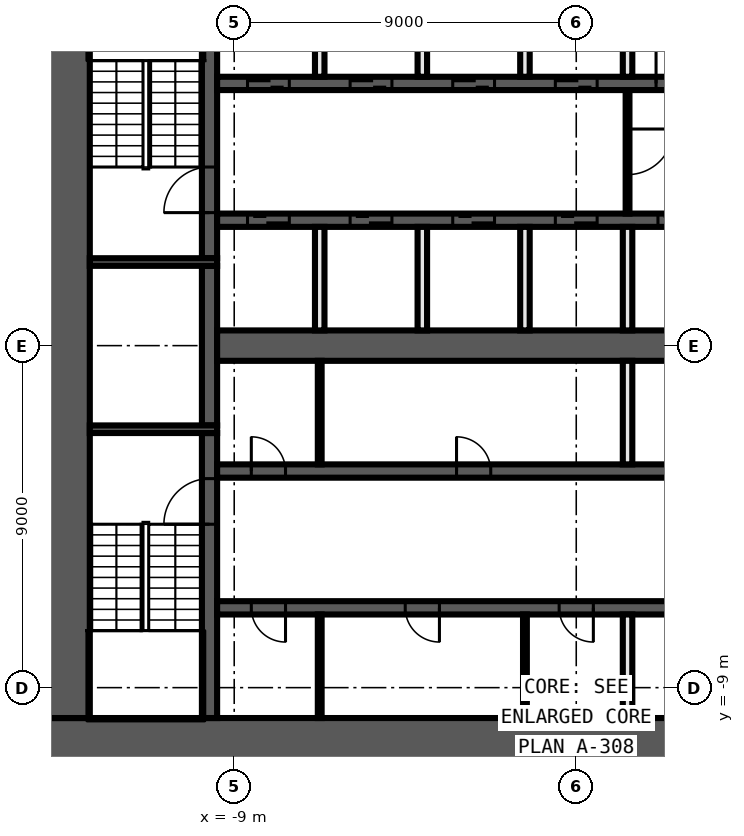
"""IFC4 building model, lengths in metres.
Left out: names, types, materials, properties, quantities, classifications, styles, units other than length and angle.
Written with IfcOpenShell. Run it as: python <this file> out.ifc"""

import sys

from ifc_helpers import new_model, si_unit, direction, frame, frame_2d, origin, place, context, subcontext, project, spatial, rectangle, extrude, element, fill, save


model = new_model("IFC4")
c1 = context("Model", 3, precision=1e-05, world=origin(), true_north=direction((0.0, 1.0)))
c2 = subcontext(c1, "Body", "Model", "MODEL_VIEW")
j1 = project(units=[si_unit("LENGTHUNIT", "METRE"), si_unit("PLANEANGLEUNIT", "RADIAN")], contexts=[c1])
p1 = place(None, origin())
s1 = spatial("IfcSite", under=j1, at=p1, CompositionType="ELEMENT")
p2 = place(p1, origin())
s2 = spatial("IfcBuilding", under=s1, at=p2, CompositionType="ELEMENT")
p3 = place(p2, frame((0.0, 0.0, 55.1)))
s3 = spatial("IfcBuildingStorey", under=s2, at=p3, CompositionType="ELEMENT", Elevation=55.1)
p4 = place(p3, frame((14.0, -10.4, 0.0), z_axis=(0.0, 0.0, 1.0), x_axis=(-1.0, 0.0, 0.0)))
e1 = element("IfcWall", 1, at=p4, inside=s3, PredefinedType="SHEAR", context=c2, shape_type="SweptSolid", body=[
    extrude(rectangle(XDim=28.0, YDim=1.2, at=frame_2d((14.0, 0.0))), origin(), (0.0, 0.0, 1.0), 3.3),
])
p5 = place(p4, frame((5.1, 0.0, 0.0)))
e2 = element("IfcOpeningElement", 2, at=p5, cuts=e1, PredefinedType="OPENING", context=c2, shape_type="SweptSolid", body=[
    extrude(rectangle(XDim=1.6, YDim=2.1, at=frame_2d((0.8, 1.05))), frame((0.0, 0.61, 0.0), z_axis=(0.0, -1.0, 0.0), x_axis=(1.0, 0.0, 0.0)), (0.0, 0.0, 1.0), 1.22),
])
p6 = place(p3, frame((-13.4, -9.8, 0.0), z_axis=(0.0, 0.0, 1.0), x_axis=(0.0, 1.0, 0.0)))
e3 = element("IfcWall", 3, at=p6, inside=s3, PredefinedType="SHEAR", context=c2, shape_type="SweptSolid", body=[
    extrude(rectangle(XDim=19.6, YDim=1.2, at=frame_2d((9.8, 0.0))), origin(), (0.0, 0.0, 1.0), 3.3),
])
p7 = place(p3, frame((-9.65, -9.8, 0.0), z_axis=(0.0, 0.0, 1.0), x_axis=(0.0, 1.0, 0.0)))
e4 = element("IfcWall", 4, at=p7, inside=s3, PredefinedType="SHEAR", context=c2, shape_type="SweptSolid", body=[
    extrude(rectangle(XDim=7.5, YDim=0.4, at=frame_2d((3.75, 0.0))), origin(), (0.0, 0.0, 1.0), 3.3),
])
p8 = place(p7, frame((5.1, 0.0, 0.0)))
e5 = element("IfcOpeningElement", 5, at=p8, cuts=e4, PredefinedType="OPENING", context=c2, shape_type="SweptSolid", body=[
    extrude(rectangle(XDim=1.2, YDim=2.1, at=frame_2d((0.6, 1.05))), frame((0.0, 0.21, 0.0), z_axis=(0.0, -1.0, 0.0), x_axis=(1.0, 0.0, 0.0)), (0.0, 0.0, 1.0), 0.42),
])
p9 = place(p3, frame((-9.65, -2.1, 0.0), z_axis=(0.0, 0.0, 1.0), x_axis=(0.0, 1.0, 0.0)))
e6 = element("IfcWall", 6, at=p9, inside=s3, PredefinedType="SHEAR", context=c2, shape_type="SweptSolid", body=[
    extrude(rectangle(XDim=4.2, YDim=0.4, at=frame_2d((2.1, 0.0))), origin(), (0.0, 0.0, 1.0), 3.3),
])
p10 = place(p3, frame((-9.65, 2.3, 0.0), z_axis=(0.0, 0.0, 1.0), x_axis=(0.0, 1.0, 0.0)))
e7 = element("IfcWall", 7, at=p10, inside=s3, PredefinedType="SHEAR", context=c2, shape_type="SweptSolid", body=[
    extrude(rectangle(XDim=7.5, YDim=0.4, at=frame_2d((3.75, 0.0))), origin(), (0.0, 0.0, 1.0), 3.3),
])
p11 = place(p10, frame((1.2, 0.0, 0.0)))
e8 = element("IfcOpeningElement", 8, at=p11, cuts=e7, PredefinedType="OPENING", context=c2, shape_type="SweptSolid", body=[
    extrude(rectangle(XDim=1.2, YDim=2.1, at=frame_2d((0.6, 1.05))), frame((0.0, 0.21, 0.0), z_axis=(0.0, -1.0, 0.0), x_axis=(1.0, 0.0, 0.0)), (0.0, 0.0, 1.0), 0.42),
])
for number, where, z_axis, x_axis in (
    (9, (-9.45, 2.2, 0.0), (0.0, 0.0, 1.0), (-1.0, 0.0, 0.0)),
    (10, (-9.45, -2.2, 0.0), (0.0, 0.0, 1.0), (-1.0, 0.0, 0.0)),
):
    element("IfcWall", number, at=place(p3, frame(where, z_axis=z_axis, x_axis=x_axis)), inside=s3, PredefinedType="SHEAR", context=c2, shape_type="SweptSolid", body=[
        extrude(rectangle(XDim=3.35, YDim=0.2, at=frame_2d((1.675, 0.0))), origin(), (0.0, 0.0, 1.0), 3.3),
    ])
p12 = place(p3, frame((-9.45, 6.9, 0.0), z_axis=(0.0, 0.0, 1.0), x_axis=(1.0, 0.0, 0.0)))
e11 = element("IfcWall", 11, at=p12, inside=s3, PredefinedType="SHEAR", context=c2, shape_type="SweptSolid", body=[
    extrude(rectangle(XDim=18.9, YDim=0.35, at=frame_2d((9.45, 0.0))), origin(), (0.0, 0.0, 1.0), 3.3),
])
p13 = place(p12, frame((0.8, 0.0, 0.0)))
e12 = element("IfcOpeningElement", 12, at=p13, cuts=e11, PredefinedType="OPENING", context=c2, shape_type="SweptSolid", body=[
    extrude(rectangle(XDim=1.1, YDim=2.1, at=frame_2d((0.55, 1.05))), frame((0.0, 0.185, 0.0), z_axis=(0.0, -1.0, 0.0), x_axis=(1.0, 0.0, 0.0)), (0.0, 0.0, 1.0), 0.37),
])
p14 = place(p12, frame((3.5, 0.0, 0.0)))
e13 = element("IfcOpeningElement", 13, at=p14, cuts=e11, PredefinedType="OPENING", context=c2, shape_type="SweptSolid", body=[
    extrude(rectangle(XDim=1.1, YDim=2.1, at=frame_2d((0.55, 1.05))), frame((0.0, 0.185, 0.0), z_axis=(0.0, -1.0, 0.0), x_axis=(1.0, 0.0, 0.0)), (0.0, 0.0, 1.0), 0.37),
])
p15 = place(p12, frame((6.2, 0.0, 0.0)))
e14 = element("IfcOpeningElement", 14, at=p15, cuts=e11, PredefinedType="OPENING", context=c2, shape_type="SweptSolid", body=[
    extrude(rectangle(XDim=1.1, YDim=2.1, at=frame_2d((0.55, 1.05))), frame((0.0, 0.185, 0.0), z_axis=(0.0, -1.0, 0.0), x_axis=(1.0, 0.0, 0.0)), (0.0, 0.0, 1.0), 0.37),
])
p16 = place(p12, frame((8.9, 0.0, 0.0)))
e15 = element("IfcOpeningElement", 15, at=p16, cuts=e11, PredefinedType="OPENING", context=c2, shape_type="SweptSolid", body=[
    extrude(rectangle(XDim=1.1, YDim=2.1, at=frame_2d((0.55, 1.05))), frame((0.0, 0.185, 0.0), z_axis=(0.0, -1.0, 0.0), x_axis=(1.0, 0.0, 0.0)), (0.0, 0.0, 1.0), 0.37),
])
p17 = place(p12, frame((11.55, 0.0, 0.0)))
e16 = element("IfcOpeningElement", 16, at=p17, cuts=e11, PredefinedType="OPENING", context=c2, shape_type="SweptSolid", body=[
    extrude(rectangle(XDim=1.2, YDim=2.1, at=frame_2d((0.6, 1.05))), frame((0.0, 0.185, 0.0), z_axis=(0.0, -1.0, 0.0), x_axis=(1.0, 0.0, 0.0)), (0.0, 0.0, 1.0), 0.37),
])
p18 = place(p12, frame((14.3, 0.0, 0.0)))
e17 = element("IfcOpeningElement", 17, at=p18, cuts=e11, PredefinedType="OPENING", context=c2, shape_type="SweptSolid", body=[
    extrude(rectangle(XDim=1.1, YDim=2.1, at=frame_2d((0.55, 1.05))), frame((0.0, 0.185, 0.0), z_axis=(0.0, -1.0, 0.0), x_axis=(1.0, 0.0, 0.0)), (0.0, 0.0, 1.0), 0.37),
])
p19 = place(p12, frame((17.0, 0.0, 0.0)))
e18 = element("IfcOpeningElement", 18, at=p19, cuts=e11, PredefinedType="OPENING", context=c2, shape_type="SweptSolid", body=[
    extrude(rectangle(XDim=1.1, YDim=2.1, at=frame_2d((0.55, 1.05))), frame((0.0, 0.185, 0.0), z_axis=(0.0, -1.0, 0.0), x_axis=(1.0, 0.0, 0.0)), (0.0, 0.0, 1.0), 0.37),
])
p20 = place(p3, frame((9.45, 3.3, 0.0), z_axis=(0.0, 0.0, 1.0), x_axis=(-1.0, 0.0, 0.0)))
e19 = element("IfcWall", 19, at=p20, inside=s3, PredefinedType="SHEAR", context=c2, shape_type="SweptSolid", body=[
    extrude(rectangle(XDim=18.9, YDim=0.35, at=frame_2d((9.45, 0.0))), origin(), (0.0, 0.0, 1.0), 3.3),
])
p21 = place(p20, frame((17.0, 0.0, 0.0)))
e20 = element("IfcOpeningElement", 20, at=p21, cuts=e19, PredefinedType="OPENING", context=c2, shape_type="SweptSolid", body=[
    extrude(rectangle(XDim=1.1, YDim=2.1, at=frame_2d((0.55, 1.05))), frame((0.0, 0.185, 0.0), z_axis=(0.0, -1.0, 0.0), x_axis=(1.0, 0.0, 0.0)), (0.0, 0.0, 1.0), 0.37),
])
p22 = place(p20, frame((14.3, 0.0, 0.0)))
e21 = element("IfcOpeningElement", 21, at=p22, cuts=e19, PredefinedType="OPENING", context=c2, shape_type="SweptSolid", body=[
    extrude(rectangle(XDim=1.1, YDim=2.1, at=frame_2d((0.55, 1.05))), frame((0.0, 0.185, 0.0), z_axis=(0.0, -1.0, 0.0), x_axis=(1.0, 0.0, 0.0)), (0.0, 0.0, 1.0), 0.37),
])
p23 = place(p20, frame((11.6, 0.0, 0.0)))
e22 = element("IfcOpeningElement", 22, at=p23, cuts=e19, PredefinedType="OPENING", context=c2, shape_type="SweptSolid", body=[
    extrude(rectangle(XDim=1.1, YDim=2.1, at=frame_2d((0.55, 1.05))), frame((0.0, 0.185, 0.0), z_axis=(0.0, -1.0, 0.0), x_axis=(1.0, 0.0, 0.0)), (0.0, 0.0, 1.0), 0.37),
])
p24 = place(p20, frame((8.9, 0.0, 0.0)))
e23 = element("IfcOpeningElement", 23, at=p24, cuts=e19, PredefinedType="OPENING", context=c2, shape_type="SweptSolid", body=[
    extrude(rectangle(XDim=1.1, YDim=2.1, at=frame_2d((0.55, 1.05))), frame((0.0, 0.185, 0.0), z_axis=(0.0, -1.0, 0.0), x_axis=(1.0, 0.0, 0.0)), (0.0, 0.0, 1.0), 0.37),
])
p25 = place(p20, frame((6.2, 0.0, 0.0)))
e24 = element("IfcOpeningElement", 24, at=p25, cuts=e19, PredefinedType="OPENING", context=c2, shape_type="SweptSolid", body=[
    extrude(rectangle(XDim=1.1, YDim=2.1, at=frame_2d((0.55, 1.05))), frame((0.0, 0.185, 0.0), z_axis=(0.0, -1.0, 0.0), x_axis=(1.0, 0.0, 0.0)), (0.0, 0.0, 1.0), 0.37),
])
p26 = place(p20, frame((3.5, 0.0, 0.0)))
e25 = element("IfcOpeningElement", 25, at=p26, cuts=e19, PredefinedType="OPENING", context=c2, shape_type="SweptSolid", body=[
    extrude(rectangle(XDim=1.1, YDim=2.1, at=frame_2d((0.55, 1.05))), frame((0.0, 0.185, 0.0), z_axis=(0.0, -1.0, 0.0), x_axis=(1.0, 0.0, 0.0)), (0.0, 0.0, 1.0), 0.37),
])
p27 = place(p20, frame((0.9, 0.0, 0.0)))
e26 = element("IfcOpeningElement", 26, at=p27, cuts=e19, PredefinedType="OPENING", context=c2, shape_type="SweptSolid", body=[
    extrude(rectangle(XDim=0.9, YDim=2.1, at=frame_2d((0.45, 1.05))), frame((0.0, 0.185, 0.0), z_axis=(0.0, -1.0, 0.0), x_axis=(1.0, 0.0, 0.0)), (0.0, 0.0, 1.0), 0.37),
])
p28 = place(p3, frame((-9.45, -3.3, 0.0), z_axis=(0.0, 0.0, 1.0), x_axis=(1.0, 0.0, 0.0)))
e27 = element("IfcWall", 27, at=p28, inside=s3, PredefinedType="SHEAR", context=c2, shape_type="SweptSolid", body=[
    extrude(rectangle(XDim=18.9, YDim=0.35, at=frame_2d((9.45, 0.0))), origin(), (0.0, 0.0, 1.0), 3.3),
])
p29 = place(p28, frame((17.0, 0.0, 0.0)))
e28 = element("IfcOpeningElement", 28, at=p29, cuts=e27, PredefinedType="OPENING", context=c2, shape_type="SweptSolid", body=[
    extrude(rectangle(XDim=1.1, YDim=2.1, at=frame_2d((0.55, 1.05))), frame((0.0, 0.185, 0.0), z_axis=(0.0, -1.0, 0.0), x_axis=(1.0, 0.0, 0.0)), (0.0, 0.0, 1.0), 0.37),
])
p30 = place(p28, frame((0.9, 0.0, 0.0)))
e29 = element("IfcOpeningElement", 29, at=p30, cuts=e27, PredefinedType="OPENING", context=c2, shape_type="SweptSolid", body=[
    extrude(rectangle(XDim=0.9, YDim=2.1, at=frame_2d((0.45, 1.05))), frame((0.0, 0.185, 0.0), z_axis=(0.0, -1.0, 0.0), x_axis=(1.0, 0.0, 0.0)), (0.0, 0.0, 1.0), 0.37),
])
p31 = place(p28, frame((6.3, 0.0, 0.0)))
e30 = element("IfcOpeningElement", 30, at=p31, cuts=e27, PredefinedType="OPENING", context=c2, shape_type="SweptSolid", body=[
    extrude(rectangle(XDim=0.9, YDim=2.1, at=frame_2d((0.45, 1.05))), frame((0.0, 0.185, 0.0), z_axis=(0.0, -1.0, 0.0), x_axis=(1.0, 0.0, 0.0)), (0.0, 0.0, 1.0), 0.37),
])
p32 = place(p3, frame((9.45, -6.9, 0.0), z_axis=(0.0, 0.0, 1.0), x_axis=(-1.0, 0.0, 0.0)))
e31 = element("IfcWall", 31, at=p32, inside=s3, PredefinedType="SHEAR", context=c2, shape_type="SweptSolid", body=[
    extrude(rectangle(XDim=18.9, YDim=0.35, at=frame_2d((9.45, 0.0))), origin(), (0.0, 0.0, 1.0), 3.3),
])
p33 = place(p32, frame((0.75, 0.0, 0.0)))
e32 = element("IfcOpeningElement", 32, at=p33, cuts=e31, PredefinedType="OPENING", context=c2, shape_type="SweptSolid", body=[
    extrude(rectangle(XDim=1.2, YDim=2.1, at=frame_2d((0.6, 1.05))), frame((0.0, 0.185, 0.0), z_axis=(0.0, -1.0, 0.0), x_axis=(1.0, 0.0, 0.0)), (0.0, 0.0, 1.0), 0.37),
])
p34 = place(p32, frame((17.1, 0.0, 0.0)))
e33 = element("IfcOpeningElement", 33, at=p34, cuts=e31, PredefinedType="OPENING", context=c2, shape_type="SweptSolid", body=[
    extrude(rectangle(XDim=0.9, YDim=2.1, at=frame_2d((0.45, 1.05))), frame((0.0, 0.185, 0.0), z_axis=(0.0, -1.0, 0.0), x_axis=(1.0, 0.0, 0.0)), (0.0, 0.0, 1.0), 0.37),
])
p35 = place(p32, frame((13.05, 0.0, 0.0)))
e34 = element("IfcOpeningElement", 34, at=p35, cuts=e31, PredefinedType="OPENING", context=c2, shape_type="SweptSolid", body=[
    extrude(rectangle(XDim=0.9, YDim=2.1, at=frame_2d((0.45, 1.05))), frame((0.0, 0.185, 0.0), z_axis=(0.0, -1.0, 0.0), x_axis=(1.0, 0.0, 0.0)), (0.0, 0.0, 1.0), 0.37),
])
p36 = place(p32, frame((9.0, 0.0, 0.0)))
e35 = element("IfcOpeningElement", 35, at=p36, cuts=e31, PredefinedType="OPENING", context=c2, shape_type="SweptSolid", body=[
    extrude(rectangle(XDim=0.9, YDim=2.1, at=frame_2d((0.45, 1.05))), frame((0.0, 0.185, 0.0), z_axis=(0.0, -1.0, 0.0), x_axis=(1.0, 0.0, 0.0)), (0.0, 0.0, 1.0), 0.37),
])
p37 = place(p3, frame((-9.45, 0.0, 0.0), z_axis=(0.0, 0.0, 1.0), x_axis=(1.0, 0.0, 0.0)))
e36 = element("IfcWall", 36, at=p37, inside=s3, PredefinedType="SHEAR", context=c2, shape_type="SweptSolid", body=[
    extrude(rectangle(XDim=18.9, YDim=0.8, at=frame_2d((9.45, 0.0))), origin(), (0.0, 0.0, 1.0), 3.3),
])
p38 = place(p3, frame((1.35, 6.725, 0.0), z_axis=(0.0, 0.0, 1.0), x_axis=(0.0, -1.0, 0.0)))
e37 = element("IfcWall", 37, at=p38, inside=s3, PredefinedType="PARTITIONING", context=c2, shape_type="SweptSolid", body=[
    extrude(rectangle(XDim=3.25, YDim=0.1, at=frame_2d((1.625, 0.0))), origin(), (0.0, 0.0, 1.0), 3.3),
])
p39 = place(p38, frame((1.025, 0.0, 0.0)))
e38 = element("IfcOpeningElement", 38, at=p39, cuts=e37, PredefinedType="OPENING", context=c2, shape_type="SweptSolid", body=[
    extrude(rectangle(XDim=1.2, YDim=2.1, at=frame_2d((0.6, 1.05))), frame((0.0, 0.06, 0.0), z_axis=(0.0, -1.0, 0.0), x_axis=(1.0, 0.0, 0.0)), (0.0, 0.0, 1.0), 0.12),
])
for number, where, z_axis, x_axis in (
    (39, (1.35, -9.8, 0.0), (0.0, 0.0, 1.0), (0.0, 1.0, 0.0)),
    (40, (1.35, -3.125, 0.0), (0.0, 0.0, 1.0), (0.0, 1.0, 0.0)),
    (41, (1.35, 0.4, 0.0), (0.0, 0.0, 1.0), (0.0, 1.0, 0.0)),
    (42, (1.35, 7.075, 0.0), (0.0, 0.0, 1.0), (0.0, 1.0, 0.0)),
):
    element("IfcWall", number, at=place(p3, frame(where, z_axis=z_axis, x_axis=x_axis)), inside=s3, PredefinedType="SOLIDWALL", context=c2, shape_type="SweptSolid", body=[
        extrude(rectangle(XDim=2.725, YDim=0.25, at=frame_2d((1.363, 0.0))), origin(), (0.0, 0.0, 1.0), 3.3),
    ])
p40 = place(p3, frame((-1.35, -9.8, 0.0), z_axis=(0.0, 0.0, 1.0), x_axis=(0.0, 1.0, 0.0)))
e43 = element("IfcWall", 43, at=p40, inside=s3, PredefinedType="PARTITIONING", context=c2, shape_type="SweptSolid", body=[
    extrude(rectangle(XDim=2.725, YDim=0.1, at=frame_2d((1.363, 0.0))), origin(), (0.0, 0.0, 1.0), 3.3),
])
for number, where, z_axis, x_axis in (
    (44, (-1.35, 0.4, 0.0), (0.0, 0.0, 1.0), (0.0, 1.0, 0.0)),
    (45, (-1.35, 7.075, 0.0), (0.0, 0.0, 1.0), (0.0, 1.0, 0.0)),
    (46, (-4.05, 0.4, 0.0), (0.0, 0.0, 1.0), (0.0, 1.0, 0.0)),
    (47, (-4.05, 7.075, 0.0), (0.0, 0.0, 1.0), (0.0, 1.0, 0.0)),
):
    element("IfcWall", number, at=place(p3, frame(where, z_axis=z_axis, x_axis=x_axis)), inside=s3, PredefinedType="SOLIDWALL", context=c2, shape_type="SweptSolid", body=[
        extrude(rectangle(XDim=2.725, YDim=0.25, at=frame_2d((1.363, 0.0))), origin(), (0.0, 0.0, 1.0), 3.3),
    ])
for number, where, z_axis, x_axis in (
    (48, (-6.75, -9.8, 0.0), (0.0, 0.0, 1.0), (0.0, 1.0, 0.0)),
    (49, (-6.75, -3.125, 0.0), (0.0, 0.0, 1.0), (0.0, 1.0, 0.0)),
):
    element("IfcWall", number, at=place(p3, frame(where, z_axis=z_axis, x_axis=x_axis)), inside=s3, PredefinedType="PARTITIONING", context=c2, shape_type="SweptSolid", body=[
        extrude(rectangle(XDim=2.725, YDim=0.1, at=frame_2d((1.363, 0.0))), origin(), (0.0, 0.0, 1.0), 3.3),
    ])
for number, where, z_axis, x_axis in (
    (50, (-6.75, 0.4, 0.0), (0.0, 0.0, 1.0), (0.0, 1.0, 0.0)),
    (51, (-6.75, 7.075, 0.0), (0.0, 0.0, 1.0), (0.0, 1.0, 0.0)),
):
    element("IfcWall", number, at=place(p3, frame(where, z_axis=z_axis, x_axis=x_axis)), inside=s3, PredefinedType="SOLIDWALL", context=c2, shape_type="SweptSolid", body=[
        extrude(rectangle(XDim=2.725, YDim=0.25, at=frame_2d((1.363, 0.0))), origin(), (0.0, 0.0, 1.0), 3.3),
    ])
p41 = place(p13, origin())
e52 = element("IfcDoor", 52, at=p41, inside=s3, OperationType="DOUBLE_DOOR_SLIDING", PredefinedType="DOOR", context=c2, shape_type="SweptSolid", body=[
    extrude(rectangle(XDim=1.1, YDim=2.1, at=frame_2d((0.55, 1.05))), frame((0.0, 0.025, 0.0), z_axis=(0.0, -1.0, 0.0), x_axis=(1.0, 0.0, 0.0)), (0.0, 0.0, 1.0), 0.05),
])
fill(e12, e52)
p42 = place(p14, origin())
e53 = element("IfcDoor", 53, at=p42, inside=s3, OperationType="DOUBLE_DOOR_SLIDING", PredefinedType="DOOR", context=c2, shape_type="SweptSolid", body=[
    extrude(rectangle(XDim=1.1, YDim=2.1, at=frame_2d((0.55, 1.05))), frame((0.0, 0.025, 0.0), z_axis=(0.0, -1.0, 0.0), x_axis=(1.0, 0.0, 0.0)), (0.0, 0.0, 1.0), 0.05),
])
fill(e13, e53)
p43 = place(p15, origin())
e54 = element("IfcDoor", 54, at=p43, inside=s3, OperationType="DOUBLE_DOOR_SLIDING", PredefinedType="DOOR", context=c2, shape_type="SweptSolid", body=[
    extrude(rectangle(XDim=1.1, YDim=2.1, at=frame_2d((0.55, 1.05))), frame((0.0, 0.025, 0.0), z_axis=(0.0, -1.0, 0.0), x_axis=(1.0, 0.0, 0.0)), (0.0, 0.0, 1.0), 0.05),
])
fill(e14, e54)
p44 = place(p16, origin())
e55 = element("IfcDoor", 55, at=p44, inside=s3, OperationType="DOUBLE_DOOR_SLIDING", PredefinedType="DOOR", context=c2, shape_type="SweptSolid", body=[
    extrude(rectangle(XDim=1.1, YDim=2.1, at=frame_2d((0.55, 1.05))), frame((0.0, 0.025, 0.0), z_axis=(0.0, -1.0, 0.0), x_axis=(1.0, 0.0, 0.0)), (0.0, 0.0, 1.0), 0.05),
])
fill(e15, e55)
p45 = place(p17, origin())
e56 = element("IfcDoor", 56, at=p45, inside=s3, OperationType="SINGLE_SWING_LEFT", PredefinedType="DOOR", context=c2, shape_type="SweptSolid", body=[
    extrude(rectangle(XDim=1.2, YDim=2.1, at=frame_2d((0.6, 1.05))), frame((0.0, 0.025, 0.0), z_axis=(0.0, -1.0, 0.0), x_axis=(1.0, 0.0, 0.0)), (0.0, 0.0, 1.0), 0.05),
])
fill(e16, e56)
p46 = place(p21, origin())
e57 = element("IfcDoor", 57, at=p46, inside=s3, OperationType="DOUBLE_DOOR_SLIDING", PredefinedType="DOOR", context=c2, shape_type="SweptSolid", body=[
    extrude(rectangle(XDim=1.1, YDim=2.1, at=frame_2d((0.55, 1.05))), frame((0.0, 0.025, 0.0), z_axis=(0.0, -1.0, 0.0), x_axis=(1.0, 0.0, 0.0)), (0.0, 0.0, 1.0), 0.05),
])
fill(e20, e57)
p47 = place(p22, origin())
e58 = element("IfcDoor", 58, at=p47, inside=s3, OperationType="DOUBLE_DOOR_SLIDING", PredefinedType="DOOR", context=c2, shape_type="SweptSolid", body=[
    extrude(rectangle(XDim=1.1, YDim=2.1, at=frame_2d((0.55, 1.05))), frame((0.0, 0.025, 0.0), z_axis=(0.0, -1.0, 0.0), x_axis=(1.0, 0.0, 0.0)), (0.0, 0.0, 1.0), 0.05),
])
fill(e21, e58)
p48 = place(p23, origin())
e59 = element("IfcDoor", 59, at=p48, inside=s3, OperationType="DOUBLE_DOOR_SLIDING", PredefinedType="DOOR", context=c2, shape_type="SweptSolid", body=[
    extrude(rectangle(XDim=1.1, YDim=2.1, at=frame_2d((0.55, 1.05))), frame((0.0, 0.025, 0.0), z_axis=(0.0, -1.0, 0.0), x_axis=(1.0, 0.0, 0.0)), (0.0, 0.0, 1.0), 0.05),
])
fill(e22, e59)
p49 = place(p24, origin())
e60 = element("IfcDoor", 60, at=p49, inside=s3, OperationType="DOUBLE_DOOR_SLIDING", PredefinedType="DOOR", context=c2, shape_type="SweptSolid", body=[
    extrude(rectangle(XDim=1.1, YDim=2.1, at=frame_2d((0.55, 1.05))), frame((0.0, 0.025, 0.0), z_axis=(0.0, -1.0, 0.0), x_axis=(1.0, 0.0, 0.0)), (0.0, 0.0, 1.0), 0.05),
])
fill(e23, e60)
p50 = place(p25, origin())
e61 = element("IfcDoor", 61, at=p50, inside=s3, OperationType="DOUBLE_DOOR_SLIDING", PredefinedType="DOOR", context=c2, shape_type="SweptSolid", body=[
    extrude(rectangle(XDim=1.1, YDim=2.1, at=frame_2d((0.55, 1.05))), frame((0.0, 0.025, 0.0), z_axis=(0.0, -1.0, 0.0), x_axis=(1.0, 0.0, 0.0)), (0.0, 0.0, 1.0), 0.05),
])
fill(e24, e61)
p51 = place(p30, origin())
e62 = element("IfcDoor", 62, at=p51, inside=s3, OperationType="SINGLE_SWING_RIGHT", PredefinedType="DOOR", context=c2, shape_type="SweptSolid", body=[
    extrude(rectangle(XDim=0.9, YDim=2.1, at=frame_2d((0.45, 1.05))), frame((0.0, 0.025, 0.0), z_axis=(0.0, -1.0, 0.0), x_axis=(1.0, 0.0, 0.0)), (0.0, 0.0, 1.0), 0.05),
])
fill(e29, e62)
p52 = place(p31, origin())
e63 = element("IfcDoor", 63, at=p52, inside=s3, OperationType="SINGLE_SWING_LEFT", PredefinedType="DOOR", context=c2, shape_type="SweptSolid", body=[
    extrude(rectangle(XDim=0.9, YDim=2.1, at=frame_2d((0.45, 1.05))), frame((0.0, 0.025, 0.0), z_axis=(0.0, -1.0, 0.0), x_axis=(1.0, 0.0, 0.0)), (0.0, 0.0, 1.0), 0.05),
])
fill(e30, e63)
p53 = place(p34, origin())
e64 = element("IfcDoor", 64, at=p53, inside=s3, OperationType="SINGLE_SWING_RIGHT", PredefinedType="DOOR", context=c2, shape_type="SweptSolid", body=[
    extrude(rectangle(XDim=0.9, YDim=2.1, at=frame_2d((0.45, 1.05))), frame((0.0, 0.025, 0.0), z_axis=(0.0, -1.0, 0.0), x_axis=(1.0, 0.0, 0.0)), (0.0, 0.0, 1.0), 0.05),
])
fill(e33, e64)
p54 = place(p35, origin())
e65 = element("IfcDoor", 65, at=p54, inside=s3, OperationType="SINGLE_SWING_LEFT", PredefinedType="DOOR", context=c2, shape_type="SweptSolid", body=[
    extrude(rectangle(XDim=0.9, YDim=2.1, at=frame_2d((0.45, 1.05))), frame((0.0, 0.025, 0.0), z_axis=(0.0, -1.0, 0.0), x_axis=(1.0, 0.0, 0.0)), (0.0, 0.0, 1.0), 0.05),
])
fill(e34, e65)
p55 = place(p36, origin())
e66 = element("IfcDoor", 66, at=p55, inside=s3, OperationType="SINGLE_SWING_RIGHT", PredefinedType="DOOR", context=c2, shape_type="SweptSolid", body=[
    extrude(rectangle(XDim=0.9, YDim=2.1, at=frame_2d((0.45, 1.05))), frame((0.0, 0.025, 0.0), z_axis=(0.0, -1.0, 0.0), x_axis=(1.0, 0.0, 0.0)), (0.0, 0.0, 1.0), 0.05),
])
fill(e35, e66)
p56 = place(p11, origin())
e67 = element("IfcDoor", 67, at=p56, inside=s3, OperationType="SINGLE_SWING_RIGHT", PredefinedType="DOOR", context=c2, shape_type="SweptSolid", body=[
    extrude(rectangle(XDim=1.2, YDim=2.1, at=frame_2d((0.6, 1.05))), frame((0.0, 0.025, 0.0), z_axis=(0.0, -1.0, 0.0), x_axis=(1.0, 0.0, 0.0)), (0.0, 0.0, 1.0), 0.05),
])
fill(e8, e67)
p57 = place(p8, origin())
e68 = element("IfcDoor", 68, at=p57, inside=s3, OperationType="SINGLE_SWING_LEFT", PredefinedType="DOOR", context=c2, shape_type="SweptSolid", body=[
    extrude(rectangle(XDim=1.2, YDim=2.1, at=frame_2d((0.6, 1.05))), frame((0.0, 0.025, 0.0), z_axis=(0.0, -1.0, 0.0), x_axis=(1.0, 0.0, 0.0)), (0.0, 0.0, 1.0), 0.05),
])
fill(e5, e68)
p58 = place(p39, origin())
e69 = element("IfcDoor", 69, at=p58, inside=s3, OperationType="SINGLE_SWING_LEFT", PredefinedType="DOOR", context=c2, shape_type="SweptSolid", body=[
    extrude(rectangle(XDim=1.2, YDim=2.1, at=frame_2d((0.6, 1.05))), frame((0.0, 0.025, 0.0), z_axis=(0.0, -1.0, 0.0), x_axis=(1.0, 0.0, 0.0)), (0.0, 0.0, 1.0), 0.05),
])
fill(e38, e69)
save(model, sys.argv[1])
